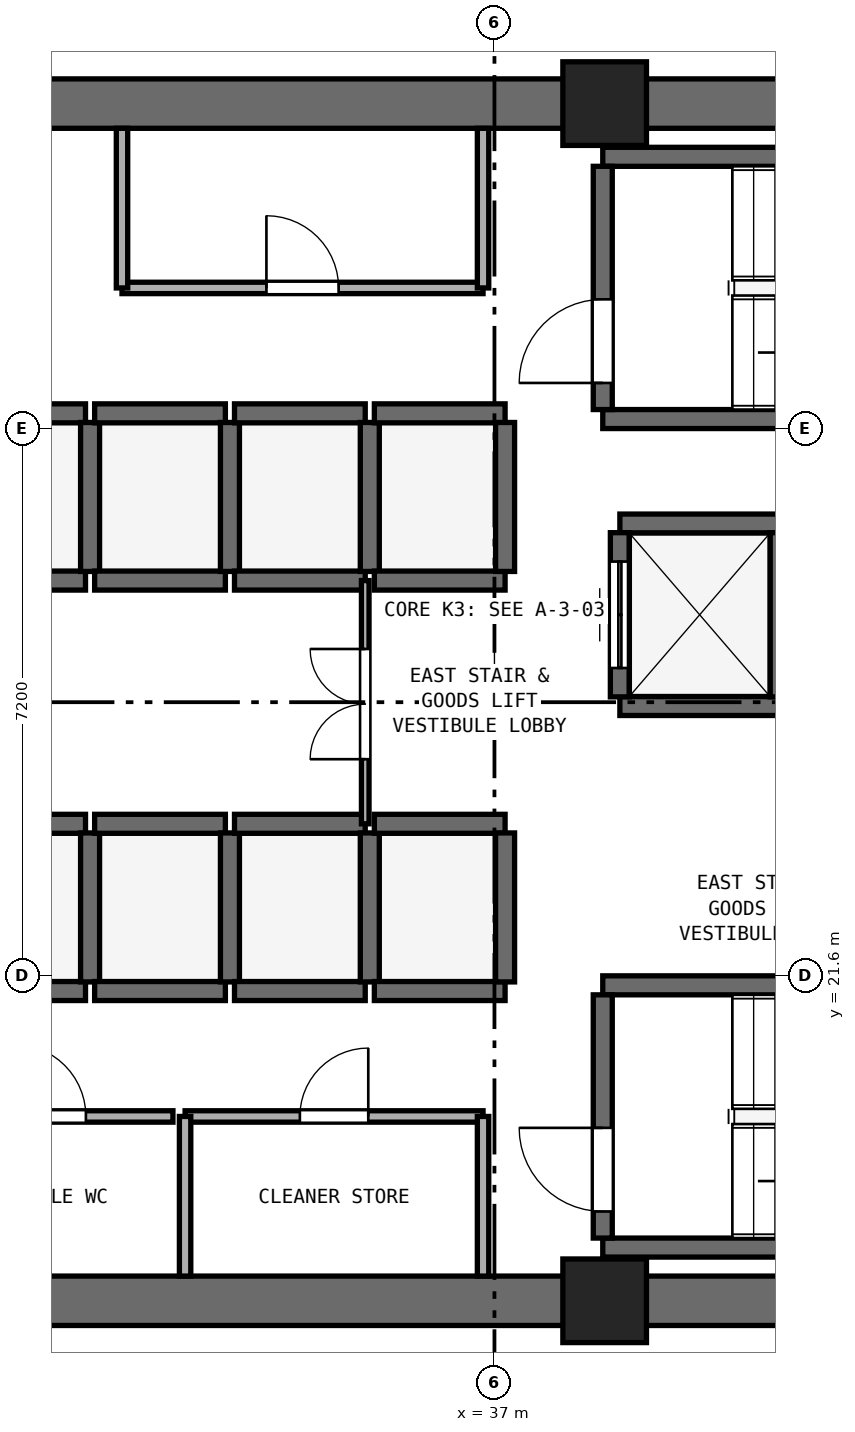
"""IFC4 building model, lengths in metres.
Left out: names, types, materials, properties, quantities, classifications, styles, units other than length and angle.
Written with IfcOpenShell. Run it as: python <this file> out.ifc"""

import sys

from ifc_helpers import new_model, si_unit, direction, frame, frame_2d, origin, origin_2d, place, context, subcontext, project, spatial, rectangle, extrude, element, fill, save


model = new_model("IFC4")
c1 = context("Model", 3, precision=1e-05, world=origin(), true_north=direction((0.0, 1.0)))
c2 = subcontext(c1, "Body", "Model", "MODEL_VIEW")
j1 = project(units=[si_unit("LENGTHUNIT", "METRE"), si_unit("PLANEANGLEUNIT", "RADIAN")], contexts=[c1])
p1 = place(None, origin())
s1 = spatial("IfcSite", under=j1, at=p1, CompositionType="ELEMENT")
p2 = place(p1, origin())
s2 = spatial("IfcBuilding", under=s1, at=p2, CompositionType="ELEMENT")
p3 = place(p2, frame((0.0, 0.0, 70.6)))
s3 = spatial("IfcBuildingStorey", under=s2, at=p3, CompositionType="ELEMENT", Elevation=70.6)
for number, where, z_axis, x_axis in (
    (1, (25.4, 17.325, 0.0), (0.0, 0.0, 1.0), (1.0, 0.0, 0.0)),
    (2, (25.4, 33.075, 0.0), (0.0, 0.0, 1.0), (1.0, 0.0, 0.0)),
):
    element("IfcWall", number, at=place(p3, frame(where, z_axis=z_axis, x_axis=x_axis)), inside=s3, PredefinedType="SHEAR", context=c2, shape_type="SweptSolid", body=[
        extrude(rectangle(XDim=23.2, YDim=0.65, at=frame_2d((11.6, 0.0))), origin(), (0.0, 0.0, 1.0), 3.525),
    ])
for number, where, z_axis, x_axis in (
    (3, (38.45, 17.325, 0.0), (0.0, 0.0, 1.0), (1.0, 0.0, 0.0)),
    (4, (38.45, 33.075, 0.0), (0.0, 0.0, 1.0), (1.0, 0.0, 0.0)),
):
    element("IfcColumn", number, at=place(p3, frame(where, z_axis=z_axis, x_axis=x_axis)), inside=s3, PredefinedType="PILASTER", context=c2, shape_type="SweptSolid", body=[
        extrude(rectangle(XDim=1.1, YDim=1.1, at=origin_2d()), origin(), (0.0, 0.0, 1.0), 3.8),
    ])
for number, where, z_axis, x_axis in (
    (5, (38.425, 28.925, 0.0), (0.0, 0.0, 1.0), (1.0, 0.0, 0.0)),
    (6, (38.425, 32.375, 0.0), (0.0, 0.0, 1.0), (1.0, 0.0, 0.0)),
):
    element("IfcWall", number, at=place(p3, frame(where, z_axis=z_axis, x_axis=x_axis)), inside=s3, PredefinedType="SHEAR", context=c2, shape_type="SweptSolid", body=[
        extrude(rectangle(XDim=7.3, YDim=0.25, at=frame_2d((3.65, 0.0))), origin(), (0.0, 0.0, 1.0), 3.525),
    ])
p4 = place(p3, frame((38.425, 29.05, 0.0), z_axis=(0.0, 0.0, 1.0), x_axis=(0.0, 1.0, 0.0)))
e7 = element("IfcWall", 7, at=p4, inside=s3, PredefinedType="SHEAR", context=c2, shape_type="SweptSolid", body=[
    extrude(rectangle(XDim=3.2, YDim=0.25, at=frame_2d((1.6, 0.0))), origin(), (0.0, 0.0, 1.0), 3.525),
])
p5 = place(p4, frame((0.35, 0.0, 0.0)))
e8 = element("IfcOpeningElement", 8, at=p5, cuts=e7, PredefinedType="OPENING", context=c2, shape_type="SweptSolid", body=[
    extrude(rectangle(XDim=1.1, YDim=2.15, at=frame_2d((0.55, 1.075))), frame((0.0, 0.135, 0.0), z_axis=(0.0, -1.0, 0.0), x_axis=(1.0, 0.0, 0.0)), (0.0, 0.0, 1.0), 0.27),
])
for number, where, z_axis, x_axis in (
    (9, (38.425, 18.025, 0.0), (0.0, 0.0, 1.0), (1.0, 0.0, 0.0)),
    (10, (38.425, 21.475, 0.0), (0.0, 0.0, 1.0), (1.0, 0.0, 0.0)),
):
    element("IfcWall", number, at=place(p3, frame(where, z_axis=z_axis, x_axis=x_axis)), inside=s3, PredefinedType="SHEAR", context=c2, shape_type="SweptSolid", body=[
        extrude(rectangle(XDim=7.3, YDim=0.25, at=frame_2d((3.65, 0.0))), origin(), (0.0, 0.0, 1.0), 3.525),
    ])
p6 = place(p3, frame((38.425, 18.15, 0.0), z_axis=(0.0, 0.0, 1.0), x_axis=(0.0, 1.0, 0.0)))
e11 = element("IfcWall", 11, at=p6, inside=s3, PredefinedType="SHEAR", context=c2, shape_type="SweptSolid", body=[
    extrude(rectangle(XDim=3.2, YDim=0.25, at=frame_2d((1.6, 0.0))), origin(), (0.0, 0.0, 1.0), 3.525),
])
p7 = place(p6, frame((0.35, 0.0, 0.0)))
e12 = element("IfcOpeningElement", 12, at=p7, cuts=e11, PredefinedType="OPENING", context=c2, shape_type="SweptSolid", body=[
    extrude(rectangle(XDim=1.1, YDim=2.15, at=frame_2d((0.55, 1.075))), frame((0.0, 0.135, 0.0), z_axis=(0.0, -1.0, 0.0), x_axis=(1.0, 0.0, 0.0)), (0.0, 0.0, 1.0), 0.27),
])
for number, where, z_axis, x_axis in (
    (13, (29.9, 21.4, 0.0), (0.0, 0.0, 1.0), (1.0, 0.0, 0.0)),
    (14, (29.9, 23.6, 0.0), (0.0, 0.0, 1.0), (1.0, 0.0, 0.0)),
):
    element("IfcWall", number, at=place(p3, frame(where, z_axis=z_axis, x_axis=x_axis)), inside=s3, PredefinedType="SHEAR", context=c2, shape_type="SweptSolid", body=[
        extrude(rectangle(XDim=1.72, YDim=0.25, at=frame_2d((0.86, 0.0))), origin(), (0.0, 0.0, 1.0), 3.525),
    ])
p8 = place(p3, frame((31.68, 21.52, 0.0), z_axis=(0.0, 0.0, 1.0), x_axis=(0.0, 1.0, 0.0)))
e15 = element("IfcWall", 15, at=p8, inside=s3, PredefinedType="SHEAR", context=c2, shape_type="SweptSolid", body=[
    extrude(rectangle(XDim=1.96, YDim=0.25, at=frame_2d((0.98, 0.0))), origin(), (0.0, 0.0, 1.0), 3.525),
])
for number, where, z_axis, x_axis in (
    (16, (31.74, 21.4, 0.0), (0.0, 0.0, 1.0), (1.0, 0.0, 0.0)),
    (17, (31.74, 23.6, 0.0), (0.0, 0.0, 1.0), (1.0, 0.0, 0.0)),
):
    element("IfcWall", number, at=place(p3, frame(where, z_axis=z_axis, x_axis=x_axis)), inside=s3, PredefinedType="SHEAR", context=c2, shape_type="SweptSolid", body=[
        extrude(rectangle(XDim=1.72, YDim=0.25, at=frame_2d((0.86, 0.0))), origin(), (0.0, 0.0, 1.0), 3.525),
    ])
p9 = place(p3, frame((33.52, 21.52, 0.0), z_axis=(0.0, 0.0, 1.0), x_axis=(0.0, 1.0, 0.0)))
e18 = element("IfcWall", 18, at=p9, inside=s3, PredefinedType="SHEAR", context=c2, shape_type="SweptSolid", body=[
    extrude(rectangle(XDim=1.96, YDim=0.25, at=frame_2d((0.98, 0.0))), origin(), (0.0, 0.0, 1.0), 3.525),
])
for number, where, z_axis, x_axis in (
    (19, (33.58, 21.4, 0.0), (0.0, 0.0, 1.0), (1.0, 0.0, 0.0)),
    (20, (33.58, 23.6, 0.0), (0.0, 0.0, 1.0), (1.0, 0.0, 0.0)),
):
    element("IfcWall", number, at=place(p3, frame(where, z_axis=z_axis, x_axis=x_axis)), inside=s3, PredefinedType="SHEAR", context=c2, shape_type="SweptSolid", body=[
        extrude(rectangle(XDim=1.72, YDim=0.25, at=frame_2d((0.86, 0.0))), origin(), (0.0, 0.0, 1.0), 3.525),
    ])
p10 = place(p3, frame((35.36, 21.52, 0.0), z_axis=(0.0, 0.0, 1.0), x_axis=(0.0, 1.0, 0.0)))
e21 = element("IfcWall", 21, at=p10, inside=s3, PredefinedType="SHEAR", context=c2, shape_type="SweptSolid", body=[
    extrude(rectangle(XDim=1.96, YDim=0.25, at=frame_2d((0.98, 0.0))), origin(), (0.0, 0.0, 1.0), 3.525),
])
for number, where, z_axis, x_axis in (
    (22, (35.42, 21.4, 0.0), (0.0, 0.0, 1.0), (1.0, 0.0, 0.0)),
    (23, (35.42, 23.6, 0.0), (0.0, 0.0, 1.0), (1.0, 0.0, 0.0)),
):
    element("IfcWall", number, at=place(p3, frame(where, z_axis=z_axis, x_axis=x_axis)), inside=s3, PredefinedType="SHEAR", context=c2, shape_type="SweptSolid", body=[
        extrude(rectangle(XDim=1.72, YDim=0.25, at=frame_2d((0.86, 0.0))), origin(), (0.0, 0.0, 1.0), 3.525),
    ])
p11 = place(p3, frame((37.14, 21.52, 0.0), z_axis=(0.0, 0.0, 1.0), x_axis=(0.0, 1.0, 0.0)))
e24 = element("IfcWall", 24, at=p11, inside=s3, PredefinedType="SHEAR", context=c2, shape_type="SweptSolid", body=[
    extrude(rectangle(XDim=1.96, YDim=0.25, at=frame_2d((0.98, 0.0))), origin(), (0.0, 0.0, 1.0), 3.525),
])
for number, where, z_axis, x_axis in (
    (25, (29.9, 26.8, 0.0), (0.0, 0.0, 1.0), (1.0, 0.0, 0.0)),
    (26, (29.9, 29.0, 0.0), (0.0, 0.0, 1.0), (1.0, 0.0, 0.0)),
):
    element("IfcWall", number, at=place(p3, frame(where, z_axis=z_axis, x_axis=x_axis)), inside=s3, PredefinedType="SHEAR", context=c2, shape_type="SweptSolid", body=[
        extrude(rectangle(XDim=1.72, YDim=0.25, at=frame_2d((0.86, 0.0))), origin(), (0.0, 0.0, 1.0), 3.525),
    ])
p12 = place(p3, frame((31.68, 26.92, 0.0), z_axis=(0.0, 0.0, 1.0), x_axis=(0.0, 1.0, 0.0)))
e27 = element("IfcWall", 27, at=p12, inside=s3, PredefinedType="SHEAR", context=c2, shape_type="SweptSolid", body=[
    extrude(rectangle(XDim=1.96, YDim=0.25, at=frame_2d((0.98, 0.0))), origin(), (0.0, 0.0, 1.0), 3.525),
])
for number, where, z_axis, x_axis in (
    (28, (31.74, 26.8, 0.0), (0.0, 0.0, 1.0), (1.0, 0.0, 0.0)),
    (29, (31.74, 29.0, 0.0), (0.0, 0.0, 1.0), (1.0, 0.0, 0.0)),
):
    element("IfcWall", number, at=place(p3, frame(where, z_axis=z_axis, x_axis=x_axis)), inside=s3, PredefinedType="SHEAR", context=c2, shape_type="SweptSolid", body=[
        extrude(rectangle(XDim=1.72, YDim=0.25, at=frame_2d((0.86, 0.0))), origin(), (0.0, 0.0, 1.0), 3.525),
    ])
p13 = place(p3, frame((33.52, 26.92, 0.0), z_axis=(0.0, 0.0, 1.0), x_axis=(0.0, 1.0, 0.0)))
e30 = element("IfcWall", 30, at=p13, inside=s3, PredefinedType="SHEAR", context=c2, shape_type="SweptSolid", body=[
    extrude(rectangle(XDim=1.96, YDim=0.25, at=frame_2d((0.98, 0.0))), origin(), (0.0, 0.0, 1.0), 3.525),
])
for number, where, z_axis, x_axis in (
    (31, (33.58, 26.8, 0.0), (0.0, 0.0, 1.0), (1.0, 0.0, 0.0)),
    (32, (33.58, 29.0, 0.0), (0.0, 0.0, 1.0), (1.0, 0.0, 0.0)),
):
    element("IfcWall", number, at=place(p3, frame(where, z_axis=z_axis, x_axis=x_axis)), inside=s3, PredefinedType="SHEAR", context=c2, shape_type="SweptSolid", body=[
        extrude(rectangle(XDim=1.72, YDim=0.25, at=frame_2d((0.86, 0.0))), origin(), (0.0, 0.0, 1.0), 3.525),
    ])
p14 = place(p3, frame((35.36, 26.92, 0.0), z_axis=(0.0, 0.0, 1.0), x_axis=(0.0, 1.0, 0.0)))
e33 = element("IfcWall", 33, at=p14, inside=s3, PredefinedType="SHEAR", context=c2, shape_type="SweptSolid", body=[
    extrude(rectangle(XDim=1.96, YDim=0.25, at=frame_2d((0.98, 0.0))), origin(), (0.0, 0.0, 1.0), 3.525),
])
for number, where, z_axis, x_axis in (
    (34, (35.42, 26.8, 0.0), (0.0, 0.0, 1.0), (1.0, 0.0, 0.0)),
    (35, (35.42, 29.0, 0.0), (0.0, 0.0, 1.0), (1.0, 0.0, 0.0)),
):
    element("IfcWall", number, at=place(p3, frame(where, z_axis=z_axis, x_axis=x_axis)), inside=s3, PredefinedType="SHEAR", context=c2, shape_type="SweptSolid", body=[
        extrude(rectangle(XDim=1.72, YDim=0.25, at=frame_2d((0.86, 0.0))), origin(), (0.0, 0.0, 1.0), 3.525),
    ])
p15 = place(p3, frame((37.14, 26.92, 0.0), z_axis=(0.0, 0.0, 1.0), x_axis=(0.0, 1.0, 0.0)))
e36 = element("IfcWall", 36, at=p15, inside=s3, PredefinedType="SHEAR", context=c2, shape_type="SweptSolid", body=[
    extrude(rectangle(XDim=1.96, YDim=0.25, at=frame_2d((0.98, 0.0))), origin(), (0.0, 0.0, 1.0), 3.525),
])
for number, where, z_axis, x_axis in (
    (37, (38.65, 25.15, 0.0), (0.0, 0.0, 1.0), (1.0, 0.0, 0.0)),
    (38, (38.65, 27.55, 0.0), (0.0, 0.0, 1.0), (1.0, 0.0, 0.0)),
):
    element("IfcWall", number, at=place(p3, frame(where, z_axis=z_axis, x_axis=x_axis)), inside=s3, PredefinedType="SHEAR", context=c2, shape_type="SweptSolid", body=[
        extrude(rectangle(XDim=2.1, YDim=0.25, at=frame_2d((1.05, 0.0))), origin(), (0.0, 0.0, 1.0), 3.525),
    ])
p16 = place(p3, frame((38.65, 25.27, 0.0), z_axis=(0.0, 0.0, 1.0), x_axis=(0.0, 1.0, 0.0)))
e39 = element("IfcWall", 39, at=p16, inside=s3, PredefinedType="SHEAR", context=c2, shape_type="SweptSolid", body=[
    extrude(rectangle(XDim=2.16, YDim=0.25, at=frame_2d((1.08, 0.0))), origin(), (0.0, 0.0, 1.0), 3.525),
])
p17 = place(p16, frame((0.38, 0.0, 0.0)))
e40 = element("IfcOpeningElement", 40, at=p17, cuts=e39, PredefinedType="OPENING", context=c2, shape_type="SweptSolid", body=[
    extrude(rectangle(XDim=1.4, YDim=2.2, at=frame_2d((0.7, 1.1))), frame((0.0, 0.135, 0.0), z_axis=(0.0, -1.0, 0.0), x_axis=(1.0, 0.0, 0.0)), (0.0, 0.0, 1.0), 0.27),
])
p18 = place(p3, frame((40.75, 25.27, 0.0), z_axis=(0.0, 0.0, 1.0), x_axis=(0.0, 1.0, 0.0)))
e41 = element("IfcWall", 41, at=p18, inside=s3, PredefinedType="SHEAR", context=c2, shape_type="SweptSolid", body=[
    extrude(rectangle(XDim=2.16, YDim=0.25, at=frame_2d((1.08, 0.0))), origin(), (0.0, 0.0, 1.0), 3.525),
])
p19 = place(p3, frame((32.1, 30.65, 0.0), z_axis=(0.0, 0.0, 1.0), x_axis=(1.0, 0.0, 0.0)))
e42 = element("IfcWall", 42, at=p19, inside=s3, PredefinedType="PARTITIONING", context=c2, shape_type="SweptSolid", body=[
    extrude(rectangle(XDim=4.75, YDim=0.15, at=frame_2d((2.375, 0.0))), origin(), (0.0, 0.0, 1.0), 3.525),
])
p20 = place(p19, frame((1.9, 0.0, 0.0)))
e43 = element("IfcOpeningElement", 43, at=p20, cuts=e42, PredefinedType="OPENING", context=c2, shape_type="SweptSolid", body=[
    extrude(rectangle(XDim=0.95, YDim=2.1, at=frame_2d((0.475, 1.05))), frame((0.0, 0.085, 0.0), z_axis=(0.0, -1.0, 0.0), x_axis=(1.0, 0.0, 0.0)), (0.0, 0.0, 1.0), 0.17),
])
for number, where, z_axis, x_axis in (
    (44, (32.1, 30.65, 0.0), (0.0, 0.0, 1.0), (0.0, 1.0, 0.0)),
    (45, (36.85, 30.65, 0.0), (0.0, 0.0, 1.0), (0.0, 1.0, 0.0)),
):
    element("IfcWall", number, at=place(p3, frame(where, z_axis=z_axis, x_axis=x_axis)), inside=s3, PredefinedType="PARTITIONING", context=c2, shape_type="SweptSolid", body=[
        extrude(rectangle(XDim=2.1, YDim=0.15, at=frame_2d((1.05, 0.0))), origin(), (0.0, 0.0, 1.0), 3.525),
    ])
p21 = place(p3, frame((29.53, 19.75, 0.0), z_axis=(0.0, 0.0, 1.0), x_axis=(1.0, 0.0, 0.0)))
e46 = element("IfcWall", 46, at=p21, inside=s3, PredefinedType="PARTITIONING", context=c2, shape_type="SweptSolid", body=[
    extrude(rectangle(XDim=3.24, YDim=0.15, at=frame_2d((1.62, 0.0))), origin(), (0.0, 0.0, 1.0), 3.525),
])
p22 = place(p21, frame((1.145, 0.0, 0.0)))
e47 = element("IfcOpeningElement", 47, at=p22, cuts=e46, PredefinedType="OPENING", context=c2, shape_type="SweptSolid", body=[
    extrude(rectangle(XDim=0.95, YDim=2.1, at=frame_2d((0.475, 1.05))), frame((0.0, 0.085, 0.0), z_axis=(0.0, -1.0, 0.0), x_axis=(1.0, 0.0, 0.0)), (0.0, 0.0, 1.0), 0.17),
])
p23 = place(p3, frame((32.93, 19.75, 0.0), z_axis=(0.0, 0.0, 1.0), x_axis=(1.0, 0.0, 0.0)))
e48 = element("IfcWall", 48, at=p23, inside=s3, PredefinedType="PARTITIONING", context=c2, shape_type="SweptSolid", body=[
    extrude(rectangle(XDim=3.92, YDim=0.15, at=frame_2d((1.96, 0.0))), origin(), (0.0, 0.0, 1.0), 3.525),
])
p24 = place(p23, frame((1.51, 0.0, 0.0)))
e49 = element("IfcOpeningElement", 49, at=p24, cuts=e48, PredefinedType="OPENING", context=c2, shape_type="SweptSolid", body=[
    extrude(rectangle(XDim=0.9, YDim=2.1, at=frame_2d((0.45, 1.05))), frame((0.0, 0.085, 0.0), z_axis=(0.0, -1.0, 0.0), x_axis=(1.0, 0.0, 0.0)), (0.0, 0.0, 1.0), 0.17),
])
for number, where, z_axis, x_axis in (
    (50, (32.93, 17.65, 0.0), (0.0, 0.0, 1.0), (0.0, 1.0, 0.0)),
    (51, (36.85, 17.65, 0.0), (0.0, 0.0, 1.0), (0.0, 1.0, 0.0)),
):
    element("IfcWall", number, at=place(p3, frame(where, z_axis=z_axis, x_axis=x_axis)), inside=s3, PredefinedType="PARTITIONING", context=c2, shape_type="SweptSolid", body=[
        extrude(rectangle(XDim=2.1, YDim=0.15, at=frame_2d((1.05, 0.0))), origin(), (0.0, 0.0, 1.0), 3.525),
    ])
p25 = place(p3, frame((35.3, 23.6, 0.0), z_axis=(0.0, 0.0, 1.0), x_axis=(0.0, 1.0, 0.0)))
e52 = element("IfcWall", 52, at=p25, inside=s3, PredefinedType="PARTITIONING", context=c2, shape_type="SweptSolid", body=[
    extrude(rectangle(XDim=3.2, YDim=0.1, at=frame_2d((1.6, 0.0))), origin(), (0.0, 0.0, 1.0), 3.525),
])
p26 = place(p25, frame((0.85, 0.0, 0.0)))
e53 = element("IfcOpeningElement", 53, at=p26, cuts=e52, PredefinedType="OPENING", context=c2, shape_type="SweptSolid", body=[
    extrude(rectangle(XDim=1.45, YDim=2.12, at=frame_2d((0.725, 1.06))), frame((0.0, 0.06, 0.0), z_axis=(0.0, -1.0, 0.0), x_axis=(1.0, 0.0, 0.0)), (0.0, 0.0, 1.0), 0.12),
])
p27 = place(p5, origin())
e54 = element("IfcDoor", 54, at=p27, inside=s3, OperationType="SINGLE_SWING_LEFT", PredefinedType="DOOR", context=c2, shape_type="SweptSolid", body=[
    extrude(rectangle(XDim=1.1, YDim=2.15, at=frame_2d((0.55, 1.075))), frame((0.0, 0.025, 0.0), z_axis=(0.0, -1.0, 0.0), x_axis=(1.0, 0.0, 0.0)), (0.0, 0.0, 1.0), 0.05),
])
fill(e8, e54)
p28 = place(p7, origin())
e55 = element("IfcDoor", 55, at=p28, inside=s3, OperationType="SINGLE_SWING_RIGHT", PredefinedType="DOOR", context=c2, shape_type="SweptSolid", body=[
    extrude(rectangle(XDim=1.1, YDim=2.15, at=frame_2d((0.55, 1.075))), frame((0.0, 0.025, 0.0), z_axis=(0.0, -1.0, 0.0), x_axis=(1.0, 0.0, 0.0)), (0.0, 0.0, 1.0), 0.05),
])
fill(e12, e55)
p29 = place(p17, origin())
e56 = element("IfcDoor", 56, at=p29, inside=s3, OperationType="DOUBLE_DOOR_SLIDING", PredefinedType="DOOR", context=c2, shape_type="SweptSolid", body=[
    extrude(rectangle(XDim=1.4, YDim=2.2, at=frame_2d((0.7, 1.1))), frame((0.0, 0.025, 0.0), z_axis=(0.0, -1.0, 0.0), x_axis=(1.0, 0.0, 0.0)), (0.0, 0.0, 1.0), 0.05),
])
fill(e40, e56)
p30 = place(p20, origin())
e57 = element("IfcDoor", 57, at=p30, inside=s3, OperationType="SINGLE_SWING_LEFT", PredefinedType="DOOR", context=c2, shape_type="SweptSolid", body=[
    extrude(rectangle(XDim=0.95, YDim=2.1, at=frame_2d((0.475, 1.05))), frame((0.0, 0.025, 0.0), z_axis=(0.0, -1.0, 0.0), x_axis=(1.0, 0.0, 0.0)), (0.0, 0.0, 1.0), 0.05),
])
fill(e43, e57)
p31 = place(p22, origin())
e58 = element("IfcDoor", 58, at=p31, inside=s3, OperationType="SINGLE_SWING_LEFT", PredefinedType="DOOR", context=c2, shape_type="SweptSolid", body=[
    extrude(rectangle(XDim=0.95, YDim=2.1, at=frame_2d((0.475, 1.05))), frame((0.0, 0.025, 0.0), z_axis=(0.0, -1.0, 0.0), x_axis=(1.0, 0.0, 0.0)), (0.0, 0.0, 1.0), 0.05),
])
fill(e47, e58)
p32 = place(p24, origin())
e59 = element("IfcDoor", 59, at=p32, inside=s3, OperationType="SINGLE_SWING_RIGHT", PredefinedType="DOOR", context=c2, shape_type="SweptSolid", body=[
    extrude(rectangle(XDim=0.9, YDim=2.1, at=frame_2d((0.45, 1.05))), frame((0.0, 0.025, 0.0), z_axis=(0.0, -1.0, 0.0), x_axis=(1.0, 0.0, 0.0)), (0.0, 0.0, 1.0), 0.05),
])
fill(e49, e59)
p33 = place(p26, origin())
e60 = element("IfcDoor", 60, at=p33, inside=s3, OperationType="DOUBLE_DOOR_SINGLE_SWING", PredefinedType="DOOR", context=c2, shape_type="SweptSolid", body=[
    extrude(rectangle(XDim=1.45, YDim=2.12, at=frame_2d((0.725, 1.06))), frame((0.0, 0.025, 0.0), z_axis=(0.0, -1.0, 0.0), x_axis=(1.0, 0.0, 0.0)), (0.0, 0.0, 1.0), 0.05),
])
fill(e53, e60)
save(model, sys.argv[1])
